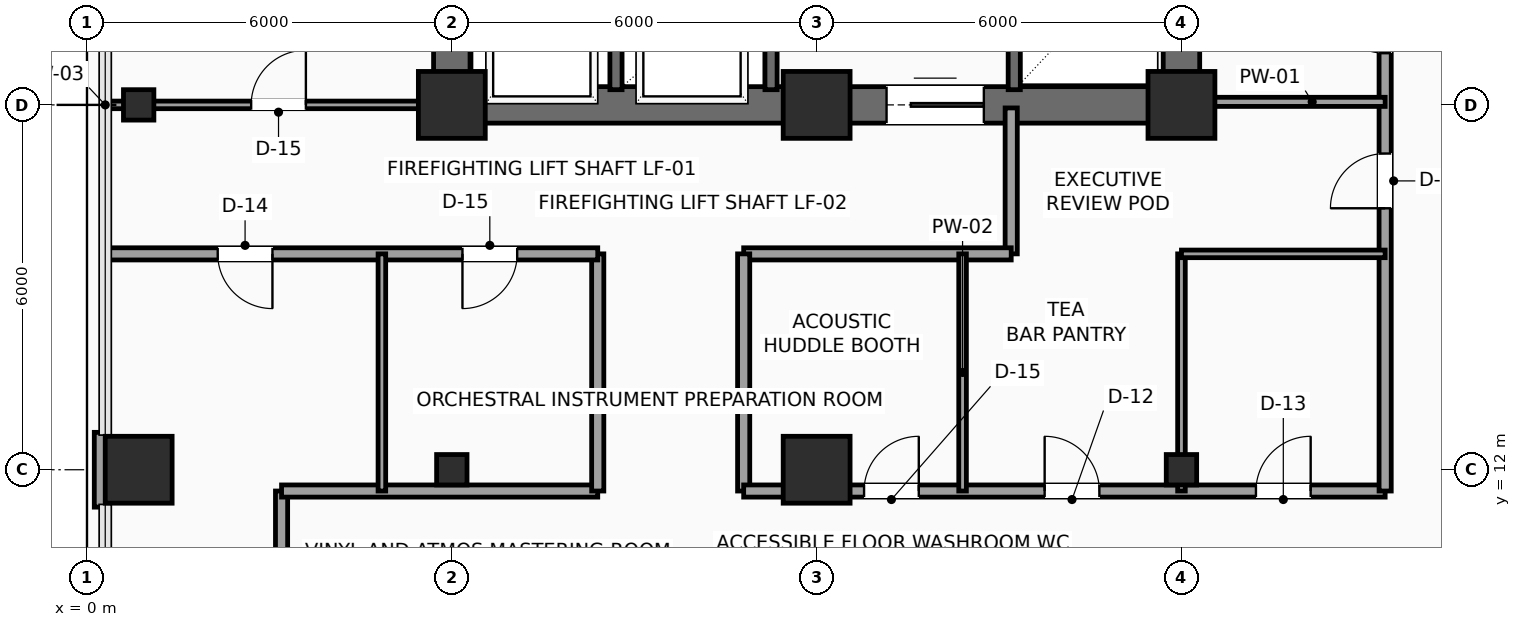
"""IFC4 building model, lengths in metres.
Left out: names, types, materials, properties, quantities, classifications, styles, units other than length and angle.
Written with IfcOpenShell. Run it as: python <this file> out.ifc"""

import sys

from ifc_helpers import new_model, si_unit, direction, frame, frame_2d, origin, origin_2d, place, context, subcontext, project, spatial, rectangle, hollow_rectangle, extrude, element, fill, save


model = new_model("IFC4")
c1 = context("Model", 3, precision=1e-05, world=origin(), true_north=direction((0.0, 1.0)))
c2 = subcontext(c1, "Body", "Model", "MODEL_VIEW")
j1 = project(units=[si_unit("LENGTHUNIT", "METRE"), si_unit("PLANEANGLEUNIT", "RADIAN")], contexts=[c1])
p1 = place(None, origin())
s1 = spatial("IfcSite", under=j1, at=p1, CompositionType="ELEMENT")
p2 = place(p1, origin())
s2 = spatial("IfcBuilding", under=s1, at=p2, CompositionType="ELEMENT")
p3 = place(p2, frame((0.0, 0.0, 149.4)))
s3 = spatial("IfcBuildingStorey", under=s2, at=p3, CompositionType="ELEMENT", Elevation=149.4)
for number, where, z_axis, x_axis in (
    (1, (6.0, 18.0, 0.0), (0.0, 0.0, 1.0), (1.0, 0.0, 0.0)),
    (2, (12.0, 18.0, 0.0), (0.0, 0.0, 1.0), (1.0, 0.0, 0.0)),
    (3, (18.0, 18.0, 0.0), (0.0, 0.0, 1.0), (1.0, 0.0, 0.0)),
    (4, (0.85, 12.0, 0.0), (0.0, 0.0, 1.0), (1.0, 0.0, 0.0)),
):
    element("IfcColumn", number, at=place(p3, frame(where, z_axis=z_axis, x_axis=x_axis)), inside=s3, PredefinedType="COLUMN", context=c2, shape_type="SweptSolid", body=[
        extrude(rectangle(XDim=1.1, YDim=1.1, at=origin_2d()), origin(), (0.0, 0.0, 1.0), 3.75),
    ])
for number, where, z_axis, x_axis in (
    (5, (0.85, 18.0, 0.0), (0.0, 0.0, 1.0), (1.0, 0.0, 0.0)),
    (6, (6.0, 12.0, 0.0), (0.0, 0.0, 1.0), (1.0, 0.0, 0.0)),
):
    element("IfcColumn", number, at=place(p3, frame(where, z_axis=z_axis, x_axis=x_axis)), inside=s3, PredefinedType="COLUMN", context=c2, shape_type="SweptSolid", body=[
        extrude(hollow_rectangle(XDim=0.5, YDim=0.5, WallThickness=0.025, InnerFilletRadius=0.025, OuterFilletRadius=0.04, at=origin_2d()), origin(), (0.0, 0.0, 1.0), 3.75),
    ])
p4 = place(p3, frame((12.0, 12.0, 0.0), z_axis=(0.0, 0.0, 1.0), x_axis=(1.0, 0.0, 0.0)))
e7 = element("IfcColumn", 7, at=p4, inside=s3, PredefinedType="COLUMN", context=c2, shape_type="SweptSolid", body=[
    extrude(rectangle(XDim=1.1, YDim=1.1, at=origin_2d()), origin(), (0.0, 0.0, 1.0), 3.75),
])
p5 = place(p3, frame((18.0, 12.0, 0.0), z_axis=(0.0, 0.0, 1.0), x_axis=(1.0, 0.0, 0.0)))
e8 = element("IfcColumn", 8, at=p5, inside=s3, PredefinedType="COLUMN", context=c2, shape_type="SweptSolid", body=[
    extrude(hollow_rectangle(XDim=0.5, YDim=0.5, WallThickness=0.025, InnerFilletRadius=0.025, OuterFilletRadius=0.04, at=origin_2d()), origin(), (0.0, 0.0, 1.0), 3.75),
])
p6 = place(p3, frame((0.24, 11.385, 0.0), z_axis=(0.0, 0.0, 1.0), x_axis=(0.0, 1.0, 0.0)))
e9 = element("IfcWall", 9, at=p6, inside=s3, PredefinedType="SOLIDWALL", context=c2, shape_type="SweptSolid", body=[
    extrude(rectangle(XDim=1.23, YDim=0.24, at=frame_2d((0.615, 0.0))), origin(), (0.0, 0.0, 1.0), 3.525),
])
p7 = place(p3, frame((6.0, 18.0, 0.0), z_axis=(0.0, 0.0, 1.0), x_axis=(1.0, 0.0, 0.0)))
e10 = element("IfcWall", 10, at=p7, inside=s3, PredefinedType="SHEAR", context=c2, shape_type="SweptSolid", body=[
    extrude(rectangle(XDim=12.0, YDim=0.6, at=frame_2d((6.0, 0.0))), origin(), (0.0, 0.0, 1.0), 3.525),
])
p8 = place(p7, frame((7.15, 0.0, 0.0)))
e11 = element("IfcOpeningElement", 11, at=p8, cuts=e10, PredefinedType="OPENING", context=c2, shape_type="SweptSolid", body=[
    extrude(rectangle(XDim=1.6, YDim=2.3, at=frame_2d((0.8, 1.15))), frame((0.0, 0.31, 0.0), z_axis=(0.0, -1.0, 0.0), x_axis=(1.0, 0.0, 0.0)), (0.0, 0.0, 1.0), 0.62),
])
for number, where, z_axis, x_axis in (
    (12, (6.0, 18.0, 0.0), (0.0, 0.0, 1.0), (0.0, 1.0, 0.0)),
    (13, (18.0, 18.0, 0.0), (0.0, 0.0, 1.0), (0.0, 1.0, 0.0)),
):
    element("IfcWall", number, at=place(p3, frame(where, z_axis=z_axis, x_axis=x_axis)), inside=s3, PredefinedType="SHEAR", context=c2, shape_type="SweptSolid", body=[
        extrude(rectangle(XDim=9.6, YDim=0.6, at=frame_2d((4.8, 0.0))), origin(), (0.0, 0.0, 1.0), 3.525),
    ])
for number, where, z_axis, x_axis in (
    (14, (8.7, 18.25, 0.0), (0.0, 0.0, 1.0), (0.0, 1.0, 0.0)),
    (15, (11.25, 18.25, 0.0), (0.0, 0.0, 1.0), (0.0, 1.0, 0.0)),
):
    element("IfcWall", number, at=place(p3, frame(where, z_axis=z_axis, x_axis=x_axis)), inside=s3, PredefinedType="SHEAR", context=c2, shape_type="SweptSolid", body=[
        extrude(rectangle(XDim=2.17, YDim=0.2, at=frame_2d((1.085, 0.0))), origin(), (0.0, 0.0, 1.0), 3.525),
    ])
p9 = place(p3, frame((15.25, 18.25, 0.0), z_axis=(0.0, 0.0, 1.0), x_axis=(0.0, 1.0, 0.0)))
e16 = element("IfcWall", 16, at=p9, inside=s3, PredefinedType="SHEAR", context=c2, shape_type="SweptSolid", body=[
    extrude(rectangle(XDim=5.2, YDim=0.2, at=frame_2d((2.6, 0.0))), origin(), (0.0, 0.0, 1.0), 3.525),
])
p10 = place(p3, frame((3.2, 9.6, 0.0), z_axis=(0.0, 0.0, 1.0), x_axis=(0.0, 1.0, 0.0)))
e17 = element("IfcWall", 17, at=p10, inside=s3, PredefinedType="SOLIDWALL", context=c2, shape_type="SweptSolid", body=[
    extrude(rectangle(XDim=2.05, YDim=0.2, at=frame_2d((1.025, 0.0))), origin(), (0.0, 0.0, 1.0), 3.525),
])
p11 = place(p3, frame((3.2, 11.65, 0.0), z_axis=(0.0, 0.0, 1.0), x_axis=(1.0, 0.0, 0.0)))
e18 = element("IfcWall", 18, at=p11, inside=s3, PredefinedType="SOLIDWALL", context=c2, shape_type="SweptSolid", body=[
    extrude(rectangle(XDim=5.2, YDim=0.2, at=frame_2d((2.6, 0.0))), origin(), (0.0, 0.0, 1.0), 3.525),
])
p12 = place(p3, frame((8.4, 11.65, 0.0), z_axis=(0.0, 0.0, 1.0), x_axis=(0.0, 1.0, 0.0)))
e19 = element("IfcWall", 19, at=p12, inside=s3, PredefinedType="SOLIDWALL", context=c2, shape_type="SweptSolid", body=[
    extrude(rectangle(XDim=3.9, YDim=0.2, at=frame_2d((1.95, 0.0))), origin(), (0.0, 0.0, 1.0), 3.525),
])
p13 = place(p3, frame((8.4, 15.55, 0.0), z_axis=(0.0, 0.0, 1.0), x_axis=(-1.0, 0.0, 0.0)))
e20 = element("IfcWall", 20, at=p13, inside=s3, PredefinedType="SOLIDWALL", context=c2, shape_type="SweptSolid", body=[
    extrude(rectangle(XDim=8.1, YDim=0.2, at=frame_2d((4.05, 0.0))), origin(), (0.0, 0.0, 1.0), 3.525),
])
p14 = place(p13, frame((5.35, 0.0, 0.0)))
e21 = element("IfcOpeningElement", 21, at=p14, cuts=e20, PredefinedType="OPENING", context=c2, shape_type="SweptSolid", body=[
    extrude(rectangle(XDim=0.9, YDim=2.1, at=frame_2d((0.45, 1.05))), frame((0.0, 0.11, 0.0), z_axis=(0.0, -1.0, 0.0), x_axis=(1.0, 0.0, 0.0)), (0.0, 0.0, 1.0), 0.22),
])
p15 = place(p13, frame((1.325, 0.0, 0.0)))
e22 = element("IfcOpeningElement", 22, at=p15, cuts=e20, PredefinedType="OPENING", context=c2, shape_type="SweptSolid", body=[
    extrude(rectangle(XDim=0.9, YDim=2.1, at=frame_2d((0.45, 1.05))), frame((0.0, 0.11, 0.0), z_axis=(0.0, -1.0, 0.0), x_axis=(1.0, 0.0, 0.0)), (0.0, 0.0, 1.0), 0.22),
])
p16 = place(p3, frame((15.2, 17.95, 0.0), z_axis=(0.0, 0.0, 1.0), x_axis=(0.0, -1.0, 0.0)))
e23 = element("IfcWall", 23, at=p16, inside=s3, PredefinedType="SOLIDWALL", context=c2, shape_type="SweptSolid", body=[
    extrude(rectangle(XDim=2.4, YDim=0.2, at=frame_2d((1.2, 0.0))), origin(), (0.0, 0.0, 1.0), 3.525),
])
p17 = place(p3, frame((15.2, 15.55, 0.0), z_axis=(0.0, 0.0, 1.0), x_axis=(-1.0, 0.0, 0.0)))
e24 = element("IfcWall", 24, at=p17, inside=s3, PredefinedType="SOLIDWALL", context=c2, shape_type="SweptSolid", body=[
    extrude(rectangle(XDim=4.4, YDim=0.2, at=frame_2d((2.2, 0.0))), origin(), (0.0, 0.0, 1.0), 3.525),
])
p18 = place(p3, frame((10.8, 15.55, 0.0), z_axis=(0.0, 0.0, 1.0), x_axis=(0.0, -1.0, 0.0)))
e25 = element("IfcWall", 25, at=p18, inside=s3, PredefinedType="SOLIDWALL", context=c2, shape_type="SweptSolid", body=[
    extrude(rectangle(XDim=3.9, YDim=0.2, at=frame_2d((1.95, 0.0))), origin(), (0.0, 0.0, 1.0), 3.525),
])
p19 = place(p3, frame((10.8, 11.65, 0.0), z_axis=(0.0, 0.0, 1.0), x_axis=(1.0, 0.0, 0.0)))
e26 = element("IfcWall", 26, at=p19, inside=s3, PredefinedType="SOLIDWALL", context=c2, shape_type="SweptSolid", body=[
    extrude(rectangle(XDim=10.55, YDim=0.2, at=frame_2d((5.275, 0.0))), origin(), (0.0, 0.0, 1.0), 3.525),
])
p20 = place(p19, frame((1.98, 0.0, 0.0)))
e27 = element("IfcOpeningElement", 27, at=p20, cuts=e26, PredefinedType="OPENING", context=c2, shape_type="SweptSolid", body=[
    extrude(rectangle(XDim=0.9, YDim=2.1, at=frame_2d((0.45, 1.05))), frame((0.0, 0.11, 0.0), z_axis=(0.0, -1.0, 0.0), x_axis=(1.0, 0.0, 0.0)), (0.0, 0.0, 1.0), 0.22),
])
p21 = place(p19, frame((4.95, 0.0, 0.0)))
e28 = element("IfcOpeningElement", 28, at=p21, cuts=e26, PredefinedType="OPENING", context=c2, shape_type="SweptSolid", body=[
    extrude(rectangle(XDim=0.9, YDim=2.1, at=frame_2d((0.45, 1.05))), frame((0.0, 0.11, 0.0), z_axis=(0.0, -1.0, 0.0), x_axis=(1.0, 0.0, 0.0)), (0.0, 0.0, 1.0), 0.22),
])
p22 = place(p19, frame((8.425, 0.0, 0.0)))
e29 = element("IfcOpeningElement", 29, at=p22, cuts=e26, PredefinedType="OPENING", context=c2, shape_type="SweptSolid", body=[
    extrude(rectangle(XDim=0.9, YDim=2.1, at=frame_2d((0.45, 1.05))), frame((0.0, 0.11, 0.0), z_axis=(0.0, -1.0, 0.0), x_axis=(1.0, 0.0, 0.0)), (0.0, 0.0, 1.0), 0.22),
])
p23 = place(p3, frame((21.35, 11.65, 0.0), z_axis=(0.0, 0.0, 1.0), x_axis=(0.0, 1.0, 0.0)))
e30 = element("IfcWall", 30, at=p23, inside=s3, PredefinedType="SOLIDWALL", context=c2, shape_type="SweptSolid", body=[
    extrude(rectangle(XDim=18.6, YDim=0.2, at=frame_2d((9.3, 0.0))), origin(), (0.0, 0.0, 1.0), 3.525),
])
p24 = place(p23, frame((7.2, 0.0, 0.0)))
e31 = element("IfcOpeningElement", 31, at=p24, cuts=e30, PredefinedType="OPENING", context=c2, shape_type="SweptSolid", body=[
    extrude(rectangle(XDim=0.95, YDim=2.15, at=frame_2d((0.475, 1.075))), frame((0.0, 0.11, 0.0), z_axis=(0.0, -1.0, 0.0), x_axis=(1.0, 0.0, 0.0)), (0.0, 0.0, 1.0), 0.22),
])
p25 = place(p23, frame((10.45, 0.0, 0.0)))
e32 = element("IfcOpeningElement", 32, at=p25, cuts=e30, PredefinedType="OPENING", context=c2, shape_type="SweptSolid", body=[
    extrude(rectangle(XDim=0.9, YDim=2.1, at=frame_2d((0.45, 1.05))), frame((0.0, 0.11, 0.0), z_axis=(0.0, -1.0, 0.0), x_axis=(1.0, 0.0, 0.0)), (0.0, 0.0, 1.0), 0.22),
])
p26 = place(p23, frame((13.9, 0.0, 0.0)))
e33 = element("IfcOpeningElement", 33, at=p26, cuts=e30, PredefinedType="OPENING", context=c2, shape_type="SweptSolid", body=[
    extrude(rectangle(XDim=0.95, YDim=2.15, at=frame_2d((0.475, 1.075))), frame((0.0, 0.11, 0.0), z_axis=(0.0, -1.0, 0.0), x_axis=(1.0, 0.0, 0.0)), (0.0, 0.0, 1.0), 0.22),
])
p27 = place(p23, frame((4.65, 0.0, 0.0)))
e34 = element("IfcOpeningElement", 34, at=p27, cuts=e30, PredefinedType="OPENING", context=c2, shape_type="SweptSolid", body=[
    extrude(rectangle(XDim=0.9, YDim=2.1, at=frame_2d((0.45, 1.05))), frame((0.0, 0.11, 0.0), z_axis=(0.0, -1.0, 0.0), x_axis=(1.0, 0.0, 0.0)), (0.0, 0.0, 1.0), 0.22),
])
p28 = place(p3, frame((14.4, 11.65, 0.0), z_axis=(0.0, 0.0, 1.0), x_axis=(0.0, 1.0, 0.0)))
e35 = element("IfcWall", 35, at=p28, inside=s3, PredefinedType="PARTITIONING", context=c2, shape_type="SweptSolid", body=[
    extrude(rectangle(XDim=3.9, YDim=0.125, at=frame_2d((1.95, 0.0))), origin(), (0.0, 0.0, 1.0), 3.525),
])
p29 = place(p3, frame((18.0, 11.65, 0.0), z_axis=(0.0, 0.0, 1.0), x_axis=(0.0, 1.0, 0.0)))
e36 = element("IfcWall", 36, at=p29, inside=s3, PredefinedType="PARTITIONING", context=c2, shape_type="SweptSolid", body=[
    extrude(rectangle(XDim=3.9, YDim=0.125, at=frame_2d((1.95, 0.0))), origin(), (0.0, 0.0, 1.0), 3.017),
])
p30 = place(p3, frame((18.0, 15.55, 0.0), z_axis=(0.0, 0.0, 1.0), x_axis=(1.0, 0.0, 0.0)))
e37 = element("IfcWall", 37, at=p30, inside=s3, PredefinedType="PARTITIONING", context=c2, shape_type="SweptSolid", body=[
    extrude(rectangle(XDim=3.35, YDim=0.125, at=frame_2d((1.675, 0.0))), origin(), (0.0, 0.0, 1.0), 3.525),
])
p31 = place(p3, frame((18.1, 18.05, 0.0), z_axis=(0.0, 0.0, 1.0), x_axis=(1.0, 0.0, 0.0)))
e38 = element("IfcWall", 38, at=p31, inside=s3, PredefinedType="PARTITIONING", context=c2, shape_type="SweptSolid", body=[
    extrude(rectangle(XDim=3.25, YDim=0.15, at=frame_2d((1.625, 0.0))), origin(), (0.0, 0.0, 1.0), 3.017),
])
p32 = place(p3, frame((0.3, 18.0, 0.0), z_axis=(0.0, 0.0, 1.0), x_axis=(1.0, 0.0, 0.0)))
e39 = element("IfcWall", 39, at=p32, inside=s3, PredefinedType="PARTITIONING", context=c2, shape_type="SweptSolid", body=[
    extrude(rectangle(XDim=5.65, YDim=0.125, at=frame_2d((2.825, 0.0))), origin(), (0.0, 0.0, 1.0), 3.017),
])
p33 = place(p32, frame((2.4, 0.0, 0.0)))
e40 = element("IfcOpeningElement", 40, at=p33, cuts=e39, PredefinedType="OPENING", context=c2, shape_type="SweptSolid", body=[
    extrude(rectangle(XDim=0.9, YDim=2.1, at=frame_2d((0.45, 1.05))), frame((0.0, 0.073, 0.0), z_axis=(0.0, -1.0, 0.0), x_axis=(1.0, 0.0, 0.0)), (0.0, 0.0, 1.0), 0.145),
])
p34 = place(p3, frame((4.85, 11.65, 0.0), z_axis=(0.0, 0.0, 1.0), x_axis=(0.0, 1.0, 0.0)))
e41 = element("IfcWall", 41, at=p34, inside=s3, PredefinedType="PARTITIONING", context=c2, shape_type="SweptSolid", body=[
    extrude(rectangle(XDim=3.9, YDim=0.125, at=frame_2d((1.95, 0.0))), origin(), (0.0, 0.0, 1.0), 3.525),
])
p35 = place(p8, origin())
e42 = element("IfcDoor", 42, at=p35, inside=s3, OperationType="DOUBLE_DOOR_SLIDING", PredefinedType="DOOR", context=c2, shape_type="SweptSolid", body=[
    extrude(rectangle(XDim=1.6, YDim=2.3, at=frame_2d((0.8, 1.15))), frame((0.0, 0.025, 0.0), z_axis=(0.0, -1.0, 0.0), x_axis=(1.0, 0.0, 0.0)), (0.0, 0.0, 1.0), 0.05),
])
fill(e11, e42)
p36 = place(p14, origin())
e43 = element("IfcDoor", 43, at=p36, inside=s3, OperationType="SINGLE_SWING_LEFT", PredefinedType="DOOR", context=c2, shape_type="SweptSolid", body=[
    extrude(rectangle(XDim=0.9, YDim=2.1, at=frame_2d((0.45, 1.05))), frame((0.0, 0.025, 0.0), z_axis=(0.0, -1.0, 0.0), x_axis=(1.0, 0.0, 0.0)), (0.0, 0.0, 1.0), 0.05),
])
fill(e21, e43)
p37 = place(p15, origin())
e44 = element("IfcDoor", 44, at=p37, inside=s3, OperationType="SINGLE_SWING_RIGHT", PredefinedType="DOOR", context=c2, shape_type="SweptSolid", body=[
    extrude(rectangle(XDim=0.9, YDim=2.1, at=frame_2d((0.45, 1.05))), frame((0.0, 0.025, 0.0), z_axis=(0.0, -1.0, 0.0), x_axis=(1.0, 0.0, 0.0)), (0.0, 0.0, 1.0), 0.05),
])
fill(e22, e44)
p38 = place(p20, origin())
e45 = element("IfcDoor", 45, at=p38, inside=s3, OperationType="SINGLE_SWING_RIGHT", PredefinedType="DOOR", context=c2, shape_type="SweptSolid", body=[
    extrude(rectangle(XDim=0.9, YDim=2.1, at=frame_2d((0.45, 1.05))), frame((0.0, 0.025, 0.0), z_axis=(0.0, -1.0, 0.0), x_axis=(1.0, 0.0, 0.0)), (0.0, 0.0, 1.0), 0.05),
])
fill(e27, e45)
p39 = place(p21, origin())
e46 = element("IfcDoor", 46, at=p39, inside=s3, OperationType="SINGLE_SWING_LEFT", PredefinedType="DOOR", context=c2, shape_type="SweptSolid", body=[
    extrude(rectangle(XDim=0.9, YDim=2.1, at=frame_2d((0.45, 1.05))), frame((0.0, 0.025, 0.0), z_axis=(0.0, -1.0, 0.0), x_axis=(1.0, 0.0, 0.0)), (0.0, 0.0, 1.0), 0.05),
])
fill(e28, e46)
p40 = place(p22, origin())
e47 = element("IfcDoor", 47, at=p40, inside=s3, OperationType="SINGLE_SWING_RIGHT", PredefinedType="DOOR", context=c2, shape_type="SweptSolid", body=[
    extrude(rectangle(XDim=0.9, YDim=2.1, at=frame_2d((0.45, 1.05))), frame((0.0, 0.025, 0.0), z_axis=(0.0, -1.0, 0.0), x_axis=(1.0, 0.0, 0.0)), (0.0, 0.0, 1.0), 0.05),
])
fill(e29, e47)
p41 = place(p24, origin())
e48 = element("IfcDoor", 48, at=p41, inside=s3, OperationType="SINGLE_SWING_RIGHT", PredefinedType="DOOR", context=c2, shape_type="SweptSolid", body=[
    extrude(rectangle(XDim=0.95, YDim=2.15, at=frame_2d((0.475, 1.075))), frame((0.0, 0.025, 0.0), z_axis=(0.0, -1.0, 0.0), x_axis=(1.0, 0.0, 0.0)), (0.0, 0.0, 1.0), 0.05),
])
fill(e31, e48)
p42 = place(p27, origin())
e49 = element("IfcDoor", 49, at=p42, inside=s3, OperationType="SINGLE_SWING_LEFT", PredefinedType="DOOR", context=c2, shape_type="SweptSolid", body=[
    extrude(rectangle(XDim=0.9, YDim=2.1, at=frame_2d((0.45, 1.05))), frame((0.0, 0.025, 0.0), z_axis=(0.0, -1.0, 0.0), x_axis=(1.0, 0.0, 0.0)), (0.0, 0.0, 1.0), 0.05),
])
fill(e34, e49)
p43 = place(p33, origin())
e50 = element("IfcDoor", 50, at=p43, inside=s3, OperationType="SINGLE_SWING_RIGHT", PredefinedType="DOOR", context=c2, shape_type="SweptSolid", body=[
    extrude(rectangle(XDim=0.9, YDim=2.1, at=frame_2d((0.45, 1.05))), frame((0.0, 0.025, 0.0), z_axis=(0.0, -1.0, 0.0), x_axis=(1.0, 0.0, 0.0)), (0.0, 0.0, 1.0), 0.05),
])
fill(e40, e50)
save(model, sys.argv[1])
